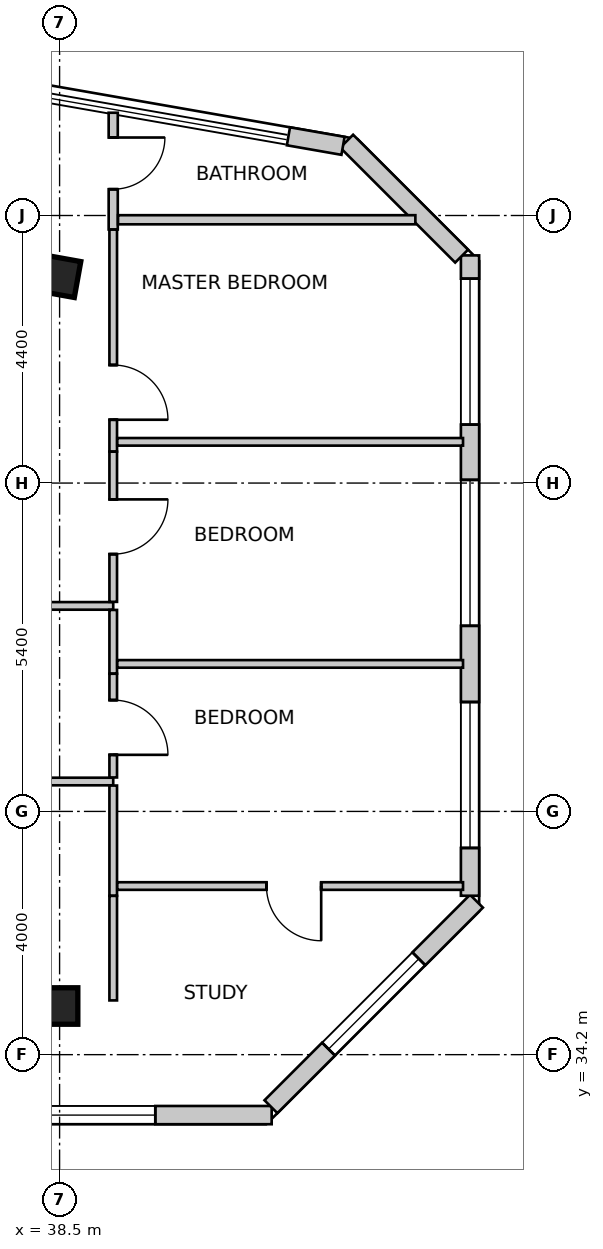
"""IFC4 building model, lengths in metres.
Left out: names, types, materials, properties, quantities, classifications, styles, units other than length and angle.
Written with IfcOpenShell. Run it as: python <this file> out.ifc"""

import sys

from ifc_helpers import new_model, si_unit, direction, frame, frame_2d, origin, origin_2d, place, context, subcontext, project, spatial, rectangle, extrude, source, transform, mapped, element, fill, save


model = new_model("IFC4")
c1 = context("Model", 3, precision=1e-05, world=origin(), true_north=direction((0.0, 1.0)))
c2 = subcontext(c1, "Body", "Model", "MODEL_VIEW")
j1 = project(units=[si_unit("LENGTHUNIT", "METRE"), si_unit("PLANEANGLEUNIT", "RADIAN")], contexts=[c1])
p1 = place(None, origin())
s1 = spatial("IfcSite", under=j1, at=p1, CompositionType="ELEMENT")
p2 = place(p1, origin())
s2 = spatial("IfcBuilding", under=s1, at=p2, CompositionType="ELEMENT")
p3 = place(p2, frame((0.0, 0.0, 274.5)))
s3 = spatial("IfcBuildingStorey", under=s2, at=p3, CompositionType="ELEMENT", Elevation=274.5)
m1 = source(origin(), c2, "Body", "SweptSolid", [
    extrude(rectangle(XDim=0.6, YDim=0.6, at=origin_2d()), origin(), (0.0, 0.0, 1.0), 3.6),
])
for number, where, z_axis, x_axis in (
    (1, (38.5, 47.0, 0.0), (0.0, 0.0, 1.0), (0.984, -0.177, 0.0)),
    (2, (38.5, 35.0, 0.0), (0.0, 0.0, 1.0), (1.0, 0.0, 0.0)),
):
    element("IfcColumn", number, at=place(p3, frame(where, z_axis=z_axis, x_axis=x_axis)), inside=s3, PredefinedType="COLUMN", context=c2, shape_type="MappedRepresentation", body=[
        mapped(m1, transform((0.0, 0.0, 0.0), scale=1.0)),
    ])
p4 = place(p3, frame((28.565, 33.206, 0.0), z_axis=(0.0, 0.0, 1.0), x_axis=(1.0, 0.0, 0.0)))
e3 = element("IfcWall", 3, at=p4, inside=s3, PredefinedType="SOLIDWALL", context=c2, shape_type="SweptSolid", body=[
    extrude(rectangle(XDim=13.423, YDim=0.3, at=frame_2d((6.711, 0.0))), origin(), (0.0, 0.0, 1.0), 3.35),
])
m2 = source(origin(), c2, "Body", "SweptSolid", [
    extrude(rectangle(XDim=1.6, YDim=2.15, at=frame_2d((0.8, 1.075))), frame((0.0, 0.16, 0.0), z_axis=(0.0, -1.0, 0.0), x_axis=(1.0, 0.0, 0.0)), (0.0, 0.0, 1.0), 0.32),
])
p5 = place(p4, frame((5.635, 0.0, 0.0)))
e4 = element("IfcOpeningElement", 4, at=p5, cuts=e3, PredefinedType="OPENING", context=c2, shape_type="MappedRepresentation", body=[
    mapped(m2, transform((0.0, 0.0, 0.0), scale=1.0)),
])
m3 = source(origin(), c2, "Body", "SweptSolid", [
    extrude(rectangle(XDim=2.4, YDim=2.2, at=frame_2d((1.2, 1.1))), frame((0.0, 0.16, 0.0), z_axis=(0.0, -1.0, 0.0), x_axis=(1.0, 0.0, 0.0)), (0.0, 0.0, 1.0), 0.32),
])
p6 = place(p4, frame((1.637, 0.0, 0.85)))
e5 = element("IfcOpeningElement", 5, at=p6, cuts=e3, PredefinedType="OPENING", context=c2, shape_type="MappedRepresentation", body=[
    mapped(m3, transform((0.0, 0.0, 0.0), scale=1.0)),
])
p7 = place(p4, frame((9.109, 0.0, 0.85)))
e6 = element("IfcOpeningElement", 6, at=p7, cuts=e3, PredefinedType="OPENING", context=c2, shape_type="MappedRepresentation", body=[
    mapped(m3, transform((0.0, 0.0, 0.0), scale=1.0)),
])
p8 = place(p3, frame((41.976, 33.344, 0.0), z_axis=(0.0, 0.0, 1.0), x_axis=(0.707132316343, 0.707081245108, 0.0)))
e7 = element("IfcWall", 7, at=p8, inside=s3, PredefinedType="SOLIDWALL", context=c2, shape_type="SweptSolid", body=[
    extrude(rectangle(XDim=4.78, YDim=0.3, at=frame_2d((2.39, 0.0))), origin(), (0.0, 0.0, 1.0), 3.35),
])
m4 = source(origin(), c2, "Body", "SweptSolid", [
    extrude(rectangle(XDim=2.1, YDim=2.0, at=frame_2d((1.05, 1.0))), frame((0.0, 0.16, 0.0), z_axis=(0.0, -1.0, 0.0), x_axis=(1.0, 0.0, 0.0)), (0.0, 0.0, 1.0), 0.32),
])
p9 = place(p8, frame((1.34, 0.0, 0.85)))
e8 = element("IfcOpeningElement", 8, at=p9, cuts=e7, PredefinedType="OPENING", context=c2, shape_type="MappedRepresentation", body=[
    mapped(m4, transform((0.0, 0.0, 0.0), scale=1.0)),
])
p10 = place(p3, frame((45.25, 36.813, 0.0), z_axis=(0.0, 0.0, 1.0), x_axis=(0.0, 1.0, 0.0)))
e9 = element("IfcWall", 9, at=p10, inside=s3, PredefinedType="SOLIDWALL", context=c2, shape_type="SweptSolid", body=[
    extrude(rectangle(XDim=10.531, YDim=0.3, at=frame_2d((5.265, 0.0))), origin(), (0.0, 0.0, 1.0), 3.35),
])
p11 = place(p10, frame((0.786, 0.0, 0.85)))
e10 = element("IfcOpeningElement", 10, at=p11, cuts=e9, PredefinedType="OPENING", context=c2, shape_type="MappedRepresentation", body=[
    mapped(m3, transform((0.0, 0.0, 0.0), scale=1.0)),
])
p12 = place(p10, frame((4.439, 0.0, 0.85)))
e11 = element("IfcOpeningElement", 11, at=p12, cuts=e9, PredefinedType="OPENING", context=c2, shape_type="MappedRepresentation", body=[
    mapped(m3, transform((0.0, 0.0, 0.0), scale=1.0)),
])
p13 = place(p10, frame((7.748, 0.0, 0.85)))
e12 = element("IfcOpeningElement", 12, at=p13, cuts=e9, PredefinedType="OPENING", context=c2, shape_type="MappedRepresentation", body=[
    mapped(m3, transform((0.0, 0.0, 0.0), scale=1.0)),
])
p14 = place(p3, frame((45.112, 47.332, 0.0), z_axis=(0.0, 0.0, 1.0), x_axis=(-0.707106781187, 0.707106781187, 0.0)))
e13 = element("IfcWall", 13, at=p14, inside=s3, PredefinedType="SOLIDWALL", context=c2, shape_type="SweptSolid", body=[
    extrude(rectangle(XDim=2.674, YDim=0.3, at=frame_2d((1.337, 0.0))), origin(), (0.0, 0.0, 1.0), 3.35),
])
p15 = place(p3, frame((43.161, 49.146, 0.0), z_axis=(0.0, 0.0, 1.0), x_axis=(-0.985052066521, 0.172256861238, 0.0)))
e14 = element("IfcWall", 14, at=p15, inside=s3, PredefinedType="SOLIDWALL", context=c2, shape_type="SweptSolid", body=[
    extrude(rectangle(XDim=0.911, YDim=0.3, at=frame_2d((0.456, 0.0))), origin(), (0.0, 0.0, 1.0), 3.35),
])
p16 = place(p3, frame((33.244, 38.692, 0.0), z_axis=(0.0, 0.0, 1.0), x_axis=(1.0, 0.0, 0.0)))
e15 = element("IfcWall", 15, at=p16, inside=s3, PredefinedType="PARTITIONING", context=c2, shape_type="SweptSolid", body=[
    extrude(rectangle(XDim=6.138, YDim=0.125, at=frame_2d((3.069, 0.0))), origin(), (0.0, 0.0, 1.0), 2.979),
])
m5 = source(origin(), c2, "Body", "SweptSolid", [
    extrude(rectangle(XDim=0.9, YDim=2.15, at=frame_2d((0.45, 1.075))), frame((0.0, 0.073, 0.0), z_axis=(0.0, -1.0, 0.0), x_axis=(1.0, 0.0, 0.0)), (0.0, 0.0, 1.0), 0.145),
])
p17 = place(p16, frame((2.619, 0.0, 0.0)))
e16 = element("IfcOpeningElement", 16, at=p17, cuts=e15, PredefinedType="OPENING", context=c2, shape_type="MappedRepresentation", body=[
    mapped(m5, transform((0.0, 0.0, 0.0), scale=1.0)),
])
p18 = place(p3, frame((39.382, 38.625, 0.0), z_axis=(0.0, 0.0, 1.0), x_axis=(0.0, -1.0, 0.0)))
e17 = element("IfcWall", 17, at=p18, inside=s3, PredefinedType="PARTITIONING", context=c2, shape_type="SweptSolid", body=[
    extrude(rectangle(XDim=1.812, YDim=0.125, at=frame_2d((0.906, 0.0))), origin(), (0.0, 0.0, 1.0), 3.35),
])
p19 = place(p3, frame((39.382, 36.811, 0.0), z_axis=(0.0, 0.0, 1.0), x_axis=(0.0, -1.0, 0.0)))
e18 = element("IfcWall", 18, at=p19, inside=s3, PredefinedType="PARTITIONING", context=c2, shape_type="SweptSolid", body=[
    extrude(rectangle(XDim=1.719, YDim=0.125, at=frame_2d((0.859, 0.0))), origin(), (0.0, 0.0, 1.0), 3.35),
])
p20 = place(p3, frame((39.382, 41.58, 0.0), z_axis=(0.0, 0.0, 1.0), x_axis=(-1.0, 0.0, 0.0)))
e19 = element("IfcWall", 19, at=p20, inside=s3, PredefinedType="PARTITIONING", context=c2, shape_type="SweptSolid", body=[
    extrude(rectangle(XDim=6.138, YDim=0.125, at=frame_2d((3.069, 0.0))), origin(), (0.0, 0.0, 1.0), 2.979),
])
m6 = source(origin(), c2, "Body", "SweptSolid", [
    extrude(rectangle(XDim=0.85, YDim=2.15, at=frame_2d((0.425, 1.075))), frame((0.0, 0.073, 0.0), z_axis=(0.0, -1.0, 0.0), x_axis=(1.0, 0.0, 0.0)), (0.0, 0.0, 1.0), 0.145),
])
p21 = place(p20, frame((2.583, 0.0, 0.0)))
e20 = element("IfcOpeningElement", 20, at=p21, cuts=e19, PredefinedType="OPENING", context=c2, shape_type="MappedRepresentation", body=[
    mapped(m6, transform((0.0, 0.0, 0.0), scale=1.0)),
])
p22 = place(p3, frame((39.382, 49.69, 0.0), z_axis=(0.0, 0.0, 1.0), x_axis=(0.0, -1.0, 0.0)))
e21 = element("IfcWall", 21, at=p22, inside=s3, PredefinedType="PARTITIONING", context=c2, shape_type="SweptSolid", body=[
    extrude(rectangle(XDim=1.92, YDim=0.15, at=frame_2d((0.96, 0.0))), origin(), (0.0, 0.0, 1.0), 3.35),
])
m7 = source(origin(), c2, "Body", "SweptSolid", [
    extrude(rectangle(XDim=0.85, YDim=2.15, at=frame_2d((0.425, 1.075))), frame((0.0, 0.085, 0.0), z_axis=(0.0, -1.0, 0.0), x_axis=(1.0, 0.0, 0.0)), (0.0, 0.0, 1.0), 0.17),
])
p23 = place(p22, frame((0.407, 0.0, 0.0)))
e22 = element("IfcOpeningElement", 22, at=p23, cuts=e21, PredefinedType="OPENING", context=c2, shape_type="MappedRepresentation", body=[
    mapped(m7, transform((0.0, 0.0, 0.0), scale=1.0)),
])
p24 = place(p3, frame((39.382, 47.768, 0.0), z_axis=(0.0, 0.0, 1.0), x_axis=(0.0, -1.0, 0.0)))
e23 = element("IfcWall", 23, at=p24, inside=s3, PredefinedType="PARTITIONING", context=c2, shape_type="SweptSolid", body=[
    extrude(rectangle(XDim=3.65, YDim=0.125, at=frame_2d((1.825, 0.0))), origin(), (0.0, 0.0, 1.0), 3.35),
])
p25 = place(p24, frame((2.227, 0.0, 0.0)))
e24 = element("IfcOpeningElement", 24, at=p25, cuts=e23, PredefinedType="OPENING", context=c2, shape_type="MappedRepresentation", body=[
    mapped(m5, transform((0.0, 0.0, 0.0), scale=1.0)),
])
p26 = place(p3, frame((39.382, 44.116, 0.0), z_axis=(0.0, 0.0, 1.0), x_axis=(0.0, -1.0, 0.0)))
e25 = element("IfcWall", 25, at=p26, inside=s3, PredefinedType="PARTITIONING", context=c2, shape_type="SweptSolid", body=[
    extrude(rectangle(XDim=2.469, YDim=0.125, at=frame_2d((1.235, 0.0))), origin(), (0.0, 0.0, 1.0), 3.35),
])
p27 = place(p26, frame((0.785, 0.0, 0.0)))
e26 = element("IfcOpeningElement", 26, at=p27, cuts=e25, PredefinedType="OPENING", context=c2, shape_type="MappedRepresentation", body=[
    mapped(m5, transform((0.0, 0.0, 0.0), scale=1.0)),
])
p28 = place(p3, frame((39.382, 41.513, 0.0), z_axis=(0.0, 0.0, 1.0), x_axis=(0.0, -1.0, 0.0)))
e27 = element("IfcWall", 27, at=p28, inside=s3, PredefinedType="PARTITIONING", context=c2, shape_type="SweptSolid", body=[
    extrude(rectangle(XDim=1.047, YDim=0.125, at=frame_2d((0.524, 0.0))), origin(), (0.0, 0.0, 1.0), 3.35),
])
p29 = place(p3, frame((39.382, 40.464, 0.0), z_axis=(0.0, 0.0, 1.0), x_axis=(0.0, -1.0, 0.0)))
e28 = element("IfcWall", 28, at=p29, inside=s3, PredefinedType="PARTITIONING", context=c2, shape_type="SweptSolid", body=[
    extrude(rectangle(XDim=1.706, YDim=0.125, at=frame_2d((0.853, 0.0))), origin(), (0.0, 0.0, 1.0), 3.35),
])
p30 = place(p29, frame((0.433, 0.0, 0.0)))
e29 = element("IfcOpeningElement", 29, at=p30, cuts=e28, PredefinedType="OPENING", context=c2, shape_type="MappedRepresentation", body=[
    mapped(m5, transform((0.0, 0.0, 0.0), scale=1.0)),
])
p31 = place(p3, frame((44.351, 47.93, 0.0), z_axis=(0.0, 0.0, 1.0), x_axis=(-1.0, 0.0, 0.0)))
e30 = element("IfcWall", 30, at=p31, inside=s3, PredefinedType="PARTITIONING", context=c2, shape_type="SweptSolid", body=[
    extrude(rectangle(XDim=4.89, YDim=0.15, at=frame_2d((2.445, 0.0))), origin(), (0.0, 0.0, 1.0), 3.35),
])
for number, where, z_axis, x_axis in (
    (31, (45.135, 44.278, 0.0), (0.0, 0.0, 1.0), (-1.0, 0.0, 0.0)),
    (32, (45.135, 40.626, 0.0), (0.0, 0.0, 1.0), (-1.0, 0.0, 0.0)),
):
    element("IfcWall", number, at=place(p3, frame(where, z_axis=z_axis, x_axis=x_axis)), inside=s3, PredefinedType="PARTITIONING", context=c2, shape_type="SweptSolid", body=[
        extrude(rectangle(XDim=5.687, YDim=0.125, at=frame_2d((2.843, 0.0))), origin(), (0.0, 0.0, 1.0), 3.35),
    ])
p32 = place(p3, frame((45.135, 36.973, 0.0), z_axis=(0.0, 0.0, 1.0), x_axis=(-1.0, 0.0, 0.0)))
e33 = element("IfcWall", 33, at=p32, inside=s3, PredefinedType="PARTITIONING", context=c2, shape_type="SweptSolid", body=[
    extrude(rectangle(XDim=5.687, YDim=0.125, at=frame_2d((2.843, 0.0))), origin(), (0.0, 0.0, 1.0), 3.35),
])
p33 = place(p32, frame((2.333, 0.0, 0.0)))
e34 = element("IfcOpeningElement", 34, at=p33, cuts=e33, PredefinedType="OPENING", context=c2, shape_type="MappedRepresentation", body=[
    mapped(m5, transform((0.0, 0.0, 0.0), scale=1.0)),
])
m8 = source(origin(), c2, "Body", "SweptSolid", [
    extrude(rectangle(XDim=2.4, YDim=2.2, at=frame_2d((1.2, 1.1))), frame((0.0, -0.015, 0.0), z_axis=(0.0, -1.0, 0.0), x_axis=(1.0, 0.0, 0.0)), (0.0, 0.0, 1.0), 0.06),
])
p34 = place(p7, origin())
e35 = element("IfcWindow", 35, at=p34, inside=s3, PartitioningType="SINGLE_PANEL", PredefinedType="WINDOW", context=c2, shape_type="MappedRepresentation", body=[
    mapped(m8, transform((0.0, 0.0, 0.0), scale=1.0)),
])
fill(e6, e35)
m9 = source(origin(), c2, "Body", "SweptSolid", [
    extrude(rectangle(XDim=2.1, YDim=2.0, at=frame_2d((1.05, 1.0))), frame((0.0, -0.015, 0.0), z_axis=(0.0, -1.0, 0.0), x_axis=(1.0, 0.0, 0.0)), (0.0, 0.0, 1.0), 0.06),
])
p35 = place(p9, origin())
e36 = element("IfcWindow", 36, at=p35, inside=s3, PartitioningType="SINGLE_PANEL", PredefinedType="WINDOW", context=c2, shape_type="MappedRepresentation", body=[
    mapped(m9, transform((0.0, 0.0, 0.0), scale=1.0)),
])
fill(e8, e36)
p36 = place(p11, origin())
e37 = element("IfcWindow", 37, at=p36, inside=s3, PartitioningType="SINGLE_PANEL", PredefinedType="WINDOW", context=c2, shape_type="MappedRepresentation", body=[
    mapped(m8, transform((0.0, 0.0, 0.0), scale=1.0)),
])
fill(e10, e37)
p37 = place(p12, origin())
e38 = element("IfcWindow", 38, at=p37, inside=s3, PartitioningType="SINGLE_PANEL", PredefinedType="WINDOW", context=c2, shape_type="MappedRepresentation", body=[
    mapped(m8, transform((0.0, 0.0, 0.0), scale=1.0)),
])
fill(e11, e38)
p38 = place(p13, origin())
e39 = element("IfcWindow", 39, at=p38, inside=s3, PartitioningType="SINGLE_PANEL", PredefinedType="WINDOW", context=c2, shape_type="MappedRepresentation", body=[
    mapped(m8, transform((0.0, 0.0, 0.0), scale=1.0)),
])
fill(e12, e39)
m10 = source(origin(), c2, "Body", "SweptSolid", [
    extrude(rectangle(XDim=0.85, YDim=2.15, at=frame_2d((0.425, 1.075))), frame((0.0, 0.025, 0.0), z_axis=(0.0, -1.0, 0.0), x_axis=(1.0, 0.0, 0.0)), (0.0, 0.0, 1.0), 0.05),
])
p39 = place(p23, origin())
e40 = element("IfcDoor", 40, at=p39, inside=s3, OperationType="SINGLE_SWING_LEFT", PredefinedType="DOOR", context=c2, shape_type="MappedRepresentation", body=[
    mapped(m10, transform((0.0, 0.0, 0.0), scale=1.0)),
])
fill(e22, e40)
m11 = source(origin(), c2, "Body", "SweptSolid", [
    extrude(rectangle(XDim=0.9, YDim=2.15, at=frame_2d((0.45, 1.075))), frame((0.0, 0.025, 0.0), z_axis=(0.0, -1.0, 0.0), x_axis=(1.0, 0.0, 0.0)), (0.0, 0.0, 1.0), 0.05),
])
p40 = place(p25, origin())
e41 = element("IfcDoor", 41, at=p40, inside=s3, OperationType="SINGLE_SWING_RIGHT", PredefinedType="DOOR", context=c2, shape_type="MappedRepresentation", body=[
    mapped(m11, transform((0.0, 0.0, 0.0), scale=1.0)),
])
fill(e24, e41)
p41 = place(p27, origin())
e42 = element("IfcDoor", 42, at=p41, inside=s3, OperationType="SINGLE_SWING_LEFT", PredefinedType="DOOR", context=c2, shape_type="MappedRepresentation", body=[
    mapped(m11, transform((0.0, 0.0, 0.0), scale=1.0)),
])
fill(e26, e42)
p42 = place(p30, origin())
e43 = element("IfcDoor", 43, at=p42, inside=s3, OperationType="SINGLE_SWING_RIGHT", PredefinedType="DOOR", context=c2, shape_type="MappedRepresentation", body=[
    mapped(m11, transform((0.0, 0.0, 0.0), scale=1.0)),
])
fill(e29, e43)
p43 = place(p33, origin())
e44 = element("IfcDoor", 44, at=p43, inside=s3, OperationType="SINGLE_SWING_LEFT", PredefinedType="DOOR", context=c2, shape_type="MappedRepresentation", body=[
    mapped(m11, transform((0.0, 0.0, 0.0), scale=1.0)),
])
fill(e34, e44)
save(model, sys.argv[1])
